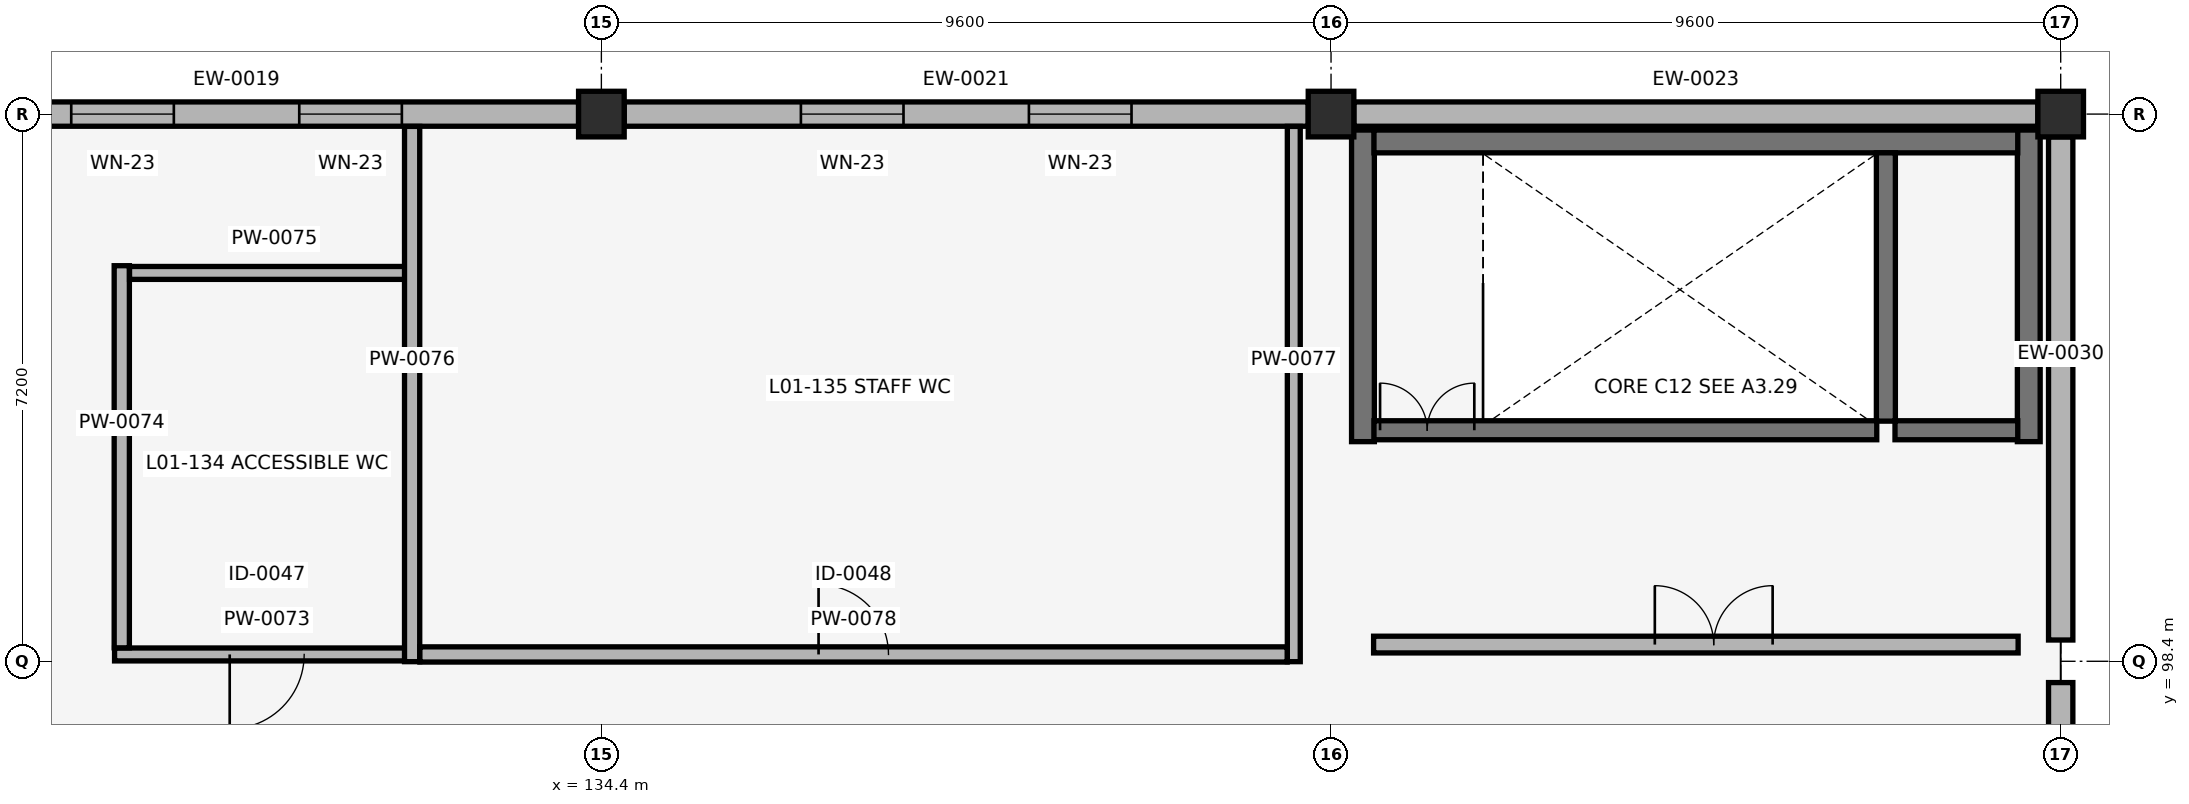
"""IFC4 building model, lengths in metres.
Left out: names, types, materials, properties, quantities, classifications, styles, units other than length and angle.
Written with IfcOpenShell. Run it as: python <this file> out.ifc"""

import sys

from ifc_helpers import new_model, si_unit, direction, frame, frame_2d, origin, origin_2d, place, context, subcontext, project, spatial, rectangle, extrude, element, fill, save


model = new_model("IFC4")
c1 = context("Model", 3, precision=1e-05, world=origin(), true_north=direction((0.0, 1.0)))
c2 = subcontext(c1, "Body", "Model", "MODEL_VIEW")
j1 = project(units=[si_unit("LENGTHUNIT", "METRE"), si_unit("PLANEANGLEUNIT", "RADIAN")], contexts=[c1])
p1 = place(None, origin())
s1 = spatial("IfcSite", under=j1, at=p1, CompositionType="ELEMENT")
p2 = place(p1, origin())
s2 = spatial("IfcBuilding", under=s1, at=p2, CompositionType="ELEMENT")
p3 = place(p2, frame((0.0, 0.0, 4.42)))
s3 = spatial("IfcBuildingStorey", under=s2, at=p3, CompositionType="ELEMENT", Elevation=4.42)
for number, where, z_axis, x_axis in (
    (1, (134.4, 105.6, 0.0), (0.0, 0.0, 1.0), (1.0, 0.0, 0.0)),
    (2, (144.0, 105.6, 0.0), (0.0, 0.0, 1.0), (1.0, 0.0, 0.0)),
    (3, (153.6, 105.6, 0.0), (0.0, 0.0, 1.0), (1.0, 0.0, 0.0)),
):
    element("IfcColumn", number, at=place(p3, frame(where, z_axis=z_axis, x_axis=x_axis)), inside=s3, PredefinedType="COLUMN", context=c2, shape_type="SweptSolid", body=[
        extrude(rectangle(XDim=0.6, YDim=0.6, at=origin_2d()), origin(), (0.0, 0.0, 1.0), 4.28),
    ])
p4 = place(p3, frame((134.1, 105.6, 0.0), z_axis=(0.0, 0.0, 1.0), x_axis=(-1.0, 0.0, 0.0)))
e4 = element("IfcWall", 4, at=p4, inside=s3, PredefinedType="SOLIDWALL", context=c2, shape_type="SweptSolid", body=[
    extrude(rectangle(XDim=9.0, YDim=0.32, at=frame_2d((4.5, 0.0))), origin(), (0.0, 0.0, 1.0), 3.63),
])
p5 = place(p4, frame((2.325, 0.0, 0.72)))
e5 = element("IfcOpeningElement", 5, at=p5, cuts=e4, PredefinedType="OPENING", context=c2, shape_type="SweptSolid", body=[
    extrude(rectangle(XDim=1.35, YDim=2.42, at=frame_2d((0.675, 1.21))), frame((0.0, 0.17, 0.0), z_axis=(0.0, -1.0, 0.0), x_axis=(1.0, 0.0, 0.0)), (0.0, 0.0, 1.0), 0.34),
])
p6 = place(p4, frame((5.325, 0.0, 0.72)))
e6 = element("IfcOpeningElement", 6, at=p6, cuts=e4, PredefinedType="OPENING", context=c2, shape_type="SweptSolid", body=[
    extrude(rectangle(XDim=1.35, YDim=2.42, at=frame_2d((0.675, 1.21))), frame((0.0, 0.17, 0.0), z_axis=(0.0, -1.0, 0.0), x_axis=(1.0, 0.0, 0.0)), (0.0, 0.0, 1.0), 0.34),
])
p7 = place(p3, frame((143.7, 105.6, 0.0), z_axis=(0.0, 0.0, 1.0), x_axis=(-1.0, 0.0, 0.0)))
e7 = element("IfcWall", 7, at=p7, inside=s3, PredefinedType="SOLIDWALL", context=c2, shape_type="SweptSolid", body=[
    extrude(rectangle(XDim=9.0, YDim=0.32, at=frame_2d((4.5, 0.0))), origin(), (0.0, 0.0, 1.0), 3.63),
])
p8 = place(p7, frame((2.325, 0.0, 0.72)))
e8 = element("IfcOpeningElement", 8, at=p8, cuts=e7, PredefinedType="OPENING", context=c2, shape_type="SweptSolid", body=[
    extrude(rectangle(XDim=1.35, YDim=2.42, at=frame_2d((0.675, 1.21))), frame((0.0, 0.17, 0.0), z_axis=(0.0, -1.0, 0.0), x_axis=(1.0, 0.0, 0.0)), (0.0, 0.0, 1.0), 0.34),
])
p9 = place(p7, frame((5.325, 0.0, 0.72)))
e9 = element("IfcOpeningElement", 9, at=p9, cuts=e7, PredefinedType="OPENING", context=c2, shape_type="SweptSolid", body=[
    extrude(rectangle(XDim=1.35, YDim=2.42, at=frame_2d((0.675, 1.21))), frame((0.0, 0.17, 0.0), z_axis=(0.0, -1.0, 0.0), x_axis=(1.0, 0.0, 0.0)), (0.0, 0.0, 1.0), 0.34),
])
p10 = place(p3, frame((153.3, 105.6, 0.0), z_axis=(0.0, 0.0, 1.0), x_axis=(-1.0, 0.0, 0.0)))
e10 = element("IfcWall", 10, at=p10, inside=s3, PredefinedType="SOLIDWALL", context=c2, shape_type="SweptSolid", body=[
    extrude(rectangle(XDim=9.0, YDim=0.32, at=frame_2d((4.5, 0.0))), origin(), (0.0, 0.0, 1.0), 3.63),
])
p11 = place(p3, frame((153.6, 91.48, 0.0), z_axis=(0.0, 0.0, 1.0), x_axis=(0.0, 1.0, 0.0)))
e11 = element("IfcWall", 11, at=p11, inside=s3, PredefinedType="SOLIDWALL", context=c2, shape_type="SweptSolid", body=[
    extrude(rectangle(XDim=6.64, YDim=0.32, at=frame_2d((3.32, 0.0))), origin(), (0.0, 0.0, 1.0), 3.63),
])
p12 = place(p11, frame((1.538, 0.0, 0.72)))
e12 = element("IfcOpeningElement", 12, at=p12, cuts=e11, PredefinedType="OPENING", context=c2, shape_type="SweptSolid", body=[
    extrude(rectangle(XDim=1.35, YDim=2.42, at=frame_2d((0.675, 1.21))), frame((0.0, 0.17, 0.0), z_axis=(0.0, -1.0, 0.0), x_axis=(1.0, 0.0, 0.0)), (0.0, 0.0, 1.0), 0.34),
])
p13 = place(p11, frame((3.752, 0.0, 0.72)))
e13 = element("IfcOpeningElement", 13, at=p13, cuts=e11, PredefinedType="OPENING", context=c2, shape_type="SweptSolid", body=[
    extrude(rectangle(XDim=1.35, YDim=2.42, at=frame_2d((0.675, 1.21))), frame((0.0, 0.17, 0.0), z_axis=(0.0, -1.0, 0.0), x_axis=(1.0, 0.0, 0.0)), (0.0, 0.0, 1.0), 0.34),
])
p14 = place(p3, frame((153.6, 98.68, 0.0), z_axis=(0.0, 0.0, 1.0), x_axis=(0.0, 1.0, 0.0)))
e14 = element("IfcWall", 14, at=p14, inside=s3, PredefinedType="SOLIDWALL", context=c2, shape_type="SweptSolid", body=[
    extrude(rectangle(XDim=6.62, YDim=0.32, at=frame_2d((3.31, 0.0))), origin(), (0.0, 0.0, 1.0), 3.63),
])
for number, where, z_axis, x_axis in (
    (15, (144.42, 101.29, 0.0), (0.0, 0.0, 1.0), (0.0, 1.0, 0.0)),
    (16, (153.18, 101.29, 0.0), (0.0, 0.0, 1.0), (0.0, 1.0, 0.0)),
):
    element("IfcWall", number, at=place(p3, frame(where, z_axis=z_axis, x_axis=x_axis)), inside=s3, PredefinedType="SHEAR", context=c2, shape_type="SweptSolid", body=[
        extrude(rectangle(XDim=4.1, YDim=0.3, at=frame_2d((2.05, 0.0))), origin(), (0.0, 0.0, 1.0), 3.8),
    ])
p15 = place(p3, frame((144.565, 105.24, 0.0), z_axis=(0.0, 0.0, 1.0), x_axis=(1.0, 0.0, 0.0)))
e17 = element("IfcWall", 17, at=p15, inside=s3, PredefinedType="SHEAR", context=c2, shape_type="SweptSolid", body=[
    extrude(rectangle(XDim=8.47, YDim=0.3, at=frame_2d((4.235, 0.0))), origin(), (0.0, 0.0, 1.0), 3.8),
])
p16 = place(p3, frame((151.3, 101.56, 0.0), z_axis=(0.0, 0.0, 1.0), x_axis=(0.0, 1.0, 0.0)))
e18 = element("IfcWall", 18, at=p16, inside=s3, PredefinedType="SHEAR", context=c2, shape_type="SweptSolid", body=[
    extrude(rectangle(XDim=3.53, YDim=0.25, at=frame_2d((1.765, 0.0))), origin(), (0.0, 0.0, 1.0), 3.8),
])
p17 = place(p3, frame((144.565, 101.44, 0.0), z_axis=(0.0, 0.0, 1.0), x_axis=(1.0, 0.0, 0.0)))
e19 = element("IfcWall", 19, at=p17, inside=s3, PredefinedType="SHEAR", context=c2, shape_type="SweptSolid", body=[
    extrude(rectangle(XDim=6.615, YDim=0.25, at=frame_2d((3.308, 0.0))), origin(), (0.0, 0.0, 1.0), 3.8),
])
p18 = place(p17, frame((0.08, 0.0, 0.0)))
e20 = element("IfcOpeningElement", 20, at=p18, cuts=e19, PredefinedType="OPENING", context=c2, shape_type="SweptSolid", body=[
    extrude(rectangle(XDim=1.24, YDim=2.15, at=frame_2d((0.62, 1.075))), frame((0.0, 0.135, 0.0), z_axis=(0.0, -1.0, 0.0), x_axis=(1.0, 0.0, 0.0)), (0.0, 0.0, 1.0), 0.27),
])
p19 = place(p3, frame((144.56, 98.62, 0.0), z_axis=(0.0, 0.0, 1.0), x_axis=(1.0, 0.0, 0.0)))
e21 = element("IfcWall", 21, at=p19, inside=s3, PredefinedType="PARTITIONING", context=c2, shape_type="SweptSolid", body=[
    extrude(rectangle(XDim=8.48, YDim=0.22, at=frame_2d((4.24, 0.0))), origin(), (0.0, 0.0, 1.0), 3.75),
])
p20 = place(p19, frame((3.7, 0.0, 0.0)))
e22 = element("IfcOpeningElement", 22, at=p20, cuts=e21, PredefinedType="OPENING", context=c2, shape_type="SweptSolid", body=[
    extrude(rectangle(XDim=1.55, YDim=2.2, at=frame_2d((0.775, 1.1))), frame((0.0, 0.12, 0.0), z_axis=(0.0, -1.0, 0.0), x_axis=(1.0, 0.0, 0.0)), (0.0, 0.0, 1.0), 0.24),
])
p21 = place(p3, frame((151.42, 101.44, 0.0), z_axis=(0.0, 0.0, 1.0), x_axis=(1.0, 0.0, 0.0)))
e23 = element("IfcWall", 23, at=p21, inside=s3, PredefinedType="SHEAR", context=c2, shape_type="SweptSolid", body=[
    extrude(rectangle(XDim=1.615, YDim=0.25, at=frame_2d((0.808, 0.0))), origin(), (0.0, 0.0, 1.0), 3.8),
])
p22 = place(p3, frame((127.995, 98.49, 0.0), z_axis=(0.0, 0.0, 1.0), x_axis=(1.0, 0.0, 0.0)))
e24 = element("IfcWall", 24, at=p22, inside=s3, PredefinedType="PLUMBINGWALL", context=c2, shape_type="SweptSolid", body=[
    extrude(rectangle(XDim=4.01, YDim=0.17, at=frame_2d((2.005, 0.0))), origin(), (0.0, 0.0, 1.0), 3.12),
])
p23 = place(p22, frame((1.515, 0.0, 0.0)))
e25 = element("IfcOpeningElement", 25, at=p23, cuts=e24, PredefinedType="OPENING", context=c2, shape_type="SweptSolid", body=[
    extrude(rectangle(XDim=0.98, YDim=2.08, at=frame_2d((0.49, 1.04))), frame((0.0, 0.095, 0.0), z_axis=(0.0, -1.0, 0.0), x_axis=(1.0, 0.0, 0.0)), (0.0, 0.0, 1.0), 0.19),
])
p24 = place(p3, frame((128.09, 98.577, 0.0), z_axis=(0.0, 0.0, 1.0), x_axis=(0.0, 1.0, 0.0)))
e26 = element("IfcWall", 26, at=p24, inside=s3, PredefinedType="PLUMBINGWALL", context=c2, shape_type="SweptSolid", body=[
    extrude(rectangle(XDim=5.028, YDim=0.2, at=frame_2d((2.514, 0.0))), origin(), (0.0, 0.0, 1.0), 3.12),
])
p25 = place(p3, frame((128.192, 103.51, 0.0), z_axis=(0.0, 0.0, 1.0), x_axis=(1.0, 0.0, 0.0)))
e27 = element("IfcWall", 27, at=p25, inside=s3, PredefinedType="PLUMBINGWALL", context=c2, shape_type="SweptSolid", body=[
    extrude(rectangle(XDim=3.813, YDim=0.17, at=frame_2d((1.906, 0.0))), origin(), (0.0, 0.0, 1.0), 3.12),
])
p26 = place(p3, frame((131.91, 98.395, 0.0), z_axis=(0.0, 0.0, 1.0), x_axis=(0.0, 1.0, 0.0)))
e28 = element("IfcWall", 28, at=p26, inside=s3, PredefinedType="PLUMBINGWALL", context=c2, shape_type="SweptSolid", body=[
    extrude(rectangle(XDim=7.043, YDim=0.2, at=frame_2d((3.521, 0.0))), origin(), (0.0, 0.0, 1.0), 3.12),
])
p27 = place(p3, frame((143.51, 98.395, 0.0), z_axis=(0.0, 0.0, 1.0), x_axis=(0.0, 1.0, 0.0)))
e29 = element("IfcWall", 29, at=p27, inside=s3, PredefinedType="PLUMBINGWALL", context=c2, shape_type="SweptSolid", body=[
    extrude(rectangle(XDim=7.043, YDim=0.17, at=frame_2d((3.521, 0.0))), origin(), (0.0, 0.0, 1.0), 3.12),
])
p28 = place(p3, frame((132.012, 98.49, 0.0), z_axis=(0.0, 0.0, 1.0), x_axis=(1.0, 0.0, 0.0)))
e30 = element("IfcWall", 30, at=p28, inside=s3, PredefinedType="PLUMBINGWALL", context=c2, shape_type="SweptSolid", body=[
    extrude(rectangle(XDim=11.411, YDim=0.2, at=frame_2d((5.706, 0.0))), origin(), (0.0, 0.0, 1.0), 3.12),
])
p29 = place(p28, frame((5.246, 0.0, 0.0)))
e31 = element("IfcOpeningElement", 31, at=p29, cuts=e30, PredefinedType="OPENING", context=c2, shape_type="SweptSolid", body=[
    extrude(rectangle(XDim=0.92, YDim=2.08, at=frame_2d((0.46, 1.04))), frame((0.0, 0.11, 0.0), z_axis=(0.0, -1.0, 0.0), x_axis=(1.0, 0.0, 0.0)), (0.0, 0.0, 1.0), 0.22),
])
p30 = place(p5, origin())
e32 = element("IfcWindow", 32, at=p30, inside=s3, PartitioningType="SINGLE_PANEL", PredefinedType="WINDOW", context=c2, shape_type="SweptSolid", body=[
    extrude(rectangle(XDim=1.35, YDim=2.42, at=frame_2d((0.675, 1.21))), frame((0.0, 0.03, 0.0), z_axis=(0.0, -1.0, 0.0), x_axis=(1.0, 0.0, 0.0)), (0.0, 0.0, 1.0), 0.06),
])
fill(e5, e32)
p31 = place(p6, origin())
e33 = element("IfcWindow", 33, at=p31, inside=s3, PartitioningType="SINGLE_PANEL", PredefinedType="WINDOW", context=c2, shape_type="SweptSolid", body=[
    extrude(rectangle(XDim=1.35, YDim=2.42, at=frame_2d((0.675, 1.21))), frame((0.0, 0.03, 0.0), z_axis=(0.0, -1.0, 0.0), x_axis=(1.0, 0.0, 0.0)), (0.0, 0.0, 1.0), 0.06),
])
fill(e6, e33)
p32 = place(p8, origin())
e34 = element("IfcWindow", 34, at=p32, inside=s3, PartitioningType="SINGLE_PANEL", PredefinedType="WINDOW", context=c2, shape_type="SweptSolid", body=[
    extrude(rectangle(XDim=1.35, YDim=2.42, at=frame_2d((0.675, 1.21))), frame((0.0, 0.03, 0.0), z_axis=(0.0, -1.0, 0.0), x_axis=(1.0, 0.0, 0.0)), (0.0, 0.0, 1.0), 0.06),
])
fill(e8, e34)
p33 = place(p9, origin())
e35 = element("IfcWindow", 35, at=p33, inside=s3, PartitioningType="SINGLE_PANEL", PredefinedType="WINDOW", context=c2, shape_type="SweptSolid", body=[
    extrude(rectangle(XDim=1.35, YDim=2.42, at=frame_2d((0.675, 1.21))), frame((0.0, 0.03, 0.0), z_axis=(0.0, -1.0, 0.0), x_axis=(1.0, 0.0, 0.0)), (0.0, 0.0, 1.0), 0.06),
])
fill(e9, e35)
p34 = place(p18, origin())
e36 = element("IfcDoor", 36, at=p34, inside=s3, OperationType="DOUBLE_DOOR_SINGLE_SWING", PredefinedType="DOOR", context=c2, shape_type="SweptSolid", body=[
    extrude(rectangle(XDim=1.24, YDim=2.15, at=frame_2d((0.62, 1.075))), frame((0.0, 0.025, 0.0), z_axis=(0.0, -1.0, 0.0), x_axis=(1.0, 0.0, 0.0)), (0.0, 0.0, 1.0), 0.05),
])
fill(e20, e36)
p35 = place(p20, origin())
e37 = element("IfcDoor", 37, at=p35, inside=s3, OperationType="DOUBLE_DOOR_SINGLE_SWING", PredefinedType="DOOR", context=c2, shape_type="SweptSolid", body=[
    extrude(rectangle(XDim=1.55, YDim=2.2, at=frame_2d((0.775, 1.1))), frame((0.0, 0.025, 0.0), z_axis=(0.0, -1.0, 0.0), x_axis=(1.0, 0.0, 0.0)), (0.0, 0.0, 1.0), 0.05),
])
fill(e22, e37)
p36 = place(p23, origin())
e38 = element("IfcDoor", 38, at=p36, inside=s3, OperationType="SINGLE_SWING_RIGHT", PredefinedType="DOOR", context=c2, shape_type="SweptSolid", body=[
    extrude(rectangle(XDim=0.98, YDim=2.08, at=frame_2d((0.49, 1.04))), frame((0.0, 0.025, 0.0), z_axis=(0.0, -1.0, 0.0), x_axis=(1.0, 0.0, 0.0)), (0.0, 0.0, 1.0), 0.05),
])
fill(e25, e38)
p37 = place(p29, origin())
e39 = element("IfcDoor", 39, at=p37, inside=s3, OperationType="SINGLE_SWING_LEFT", PredefinedType="DOOR", context=c2, shape_type="SweptSolid", body=[
    extrude(rectangle(XDim=0.92, YDim=2.08, at=frame_2d((0.46, 1.04))), frame((0.0, 0.025, 0.0), z_axis=(0.0, -1.0, 0.0), x_axis=(1.0, 0.0, 0.0)), (0.0, 0.0, 1.0), 0.05),
])
fill(e31, e39)
save(model, sys.argv[1])
